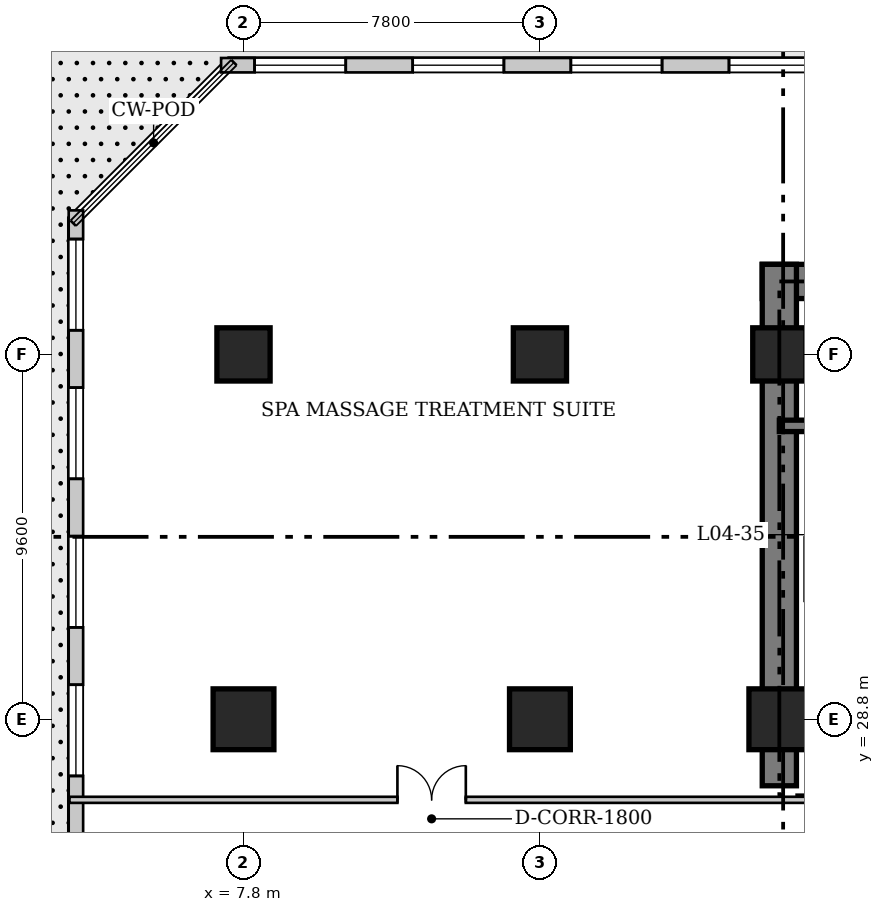
"""IFC4 building model, lengths in metres.
Left out: names, types, materials, properties, quantities, classifications, styles, units other than length and angle.
Written with IfcOpenShell. Run it as: python <this file> out.ifc"""

import sys

from ifc_helpers import new_model, si_unit, direction, frame, frame_2d, origin, origin_2d, place, context, subcontext, project, spatial, rectangle, extrude, element, fill, save


model = new_model("IFC4")
c1 = context("Model", 3, precision=1e-05, world=origin(), true_north=direction((0.0, 1.0)))
c2 = subcontext(c1, "Body", "Model", "MODEL_VIEW")
j1 = project(units=[si_unit("LENGTHUNIT", "METRE"), si_unit("PLANEANGLEUNIT", "RADIAN")], contexts=[c1])
p1 = place(None, origin())
s1 = spatial("IfcSite", under=j1, at=p1, CompositionType="ELEMENT")
p2 = place(p1, origin())
s2 = spatial("IfcBuilding", under=s1, at=p2, CompositionType="ELEMENT")
p3 = place(p2, frame((0.0, 0.0, 20.8)))
s3 = spatial("IfcBuildingStorey", under=s2, at=p3, CompositionType="ELEMENT", Elevation=20.8)
p4 = place(p3, frame((21.45, 40.32, 0.0), z_axis=(0.0, 0.0, 1.0), x_axis=(1.0, 0.0, 0.0)))
e1 = element("IfcWall", 1, at=p4, inside=s3, PredefinedType="SHEAR", context=c2, shape_type="SweptSolid", body=[
    extrude(rectangle(XDim=14.4, YDim=0.9, at=frame_2d((7.2, 0.0))), origin(), (0.0, 0.0, 1.0), 5.2),
])
p5 = place(p3, frame((21.9, 27.05, 0.0), z_axis=(0.0, 0.0, 1.0), x_axis=(0.0, 1.0, 0.0)))
e2 = element("IfcWall", 2, at=p5, inside=s3, PredefinedType="SHEAR", context=c2, shape_type="SweptSolid", body=[
    extrude(rectangle(XDim=13.72, YDim=0.9, at=frame_2d((6.86, 0.0))), origin(), (0.0, 0.0, 1.0), 5.2),
])
p6 = place(p3, frame((21.9, 36.52, 0.0), z_axis=(0.0, 0.0, 1.0), x_axis=(1.0, 0.0, 0.0)))
e3 = element("IfcWall", 3, at=p6, inside=s3, PredefinedType="SHEAR", context=c2, shape_type="SweptSolid", body=[
    extrude(rectangle(XDim=8.32, YDim=0.3, at=frame_2d((4.16, 0.0))), origin(), (0.0, 0.0, 1.0), 5.2),
])
p7 = place(p6, frame((0.9, 0.0, 0.0)))
e4 = element("IfcOpeningElement", 4, at=p7, cuts=e3, PredefinedType="OPENING", context=c2, shape_type="SweptSolid", body=[
    extrude(rectangle(XDim=1.1, YDim=2.15, at=frame_2d((0.55, 1.075))), frame((0.0, 0.16, 0.0), z_axis=(0.0, -1.0, 0.0), x_axis=(1.0, 0.0, 0.0)), (0.0, 0.0, 1.0), 0.32),
])
p8 = place(p3, frame((7.8, 28.8, 0.0), z_axis=(0.0, 0.0, 1.0), x_axis=(1.0, 0.0, 0.0)))
e5 = element("IfcColumn", 5, at=p8, inside=s3, PredefinedType="COLUMN", context=c2, shape_type="SweptSolid", body=[
    extrude(rectangle(XDim=1.6, YDim=1.6, at=origin_2d()), origin(), (0.0, 0.0, 1.0), 5.2),
])
p9 = place(p3, frame((7.8, 38.4, 0.0), z_axis=(0.0, 0.0, 1.0), x_axis=(1.0, 0.0, 0.0)))
e6 = element("IfcColumn", 6, at=p9, inside=s3, PredefinedType="COLUMN", context=c2, shape_type="SweptSolid", body=[
    extrude(rectangle(XDim=1.4, YDim=1.4, at=origin_2d()), origin(), (0.0, 0.0, 1.0), 5.2),
])
p10 = place(p3, frame((15.6, 28.8, 0.0), z_axis=(0.0, 0.0, 1.0), x_axis=(1.0, 0.0, 0.0)))
e7 = element("IfcColumn", 7, at=p10, inside=s3, PredefinedType="COLUMN", context=c2, shape_type="SweptSolid", body=[
    extrude(rectangle(XDim=1.6, YDim=1.6, at=origin_2d()), origin(), (0.0, 0.0, 1.0), 5.2),
])
p11 = place(p3, frame((15.6, 38.4, 0.0), z_axis=(0.0, 0.0, 1.0), x_axis=(1.0, 0.0, 0.0)))
e8 = element("IfcColumn", 8, at=p11, inside=s3, PredefinedType="COLUMN", context=c2, shape_type="SweptSolid", body=[
    extrude(rectangle(XDim=1.4, YDim=1.4, at=origin_2d()), origin(), (0.0, 0.0, 1.0), 5.2),
])
p12 = place(p3, frame((21.9, 28.8, 0.0), z_axis=(0.0, 0.0, 1.0), x_axis=(1.0, 0.0, 0.0)))
e9 = element("IfcColumn", 9, at=p12, inside=s3, PredefinedType="COLUMN", context=c2, shape_type="SweptSolid", body=[
    extrude(rectangle(XDim=1.6, YDim=1.6, at=origin_2d()), origin(), (0.0, 0.0, 1.0), 5.2),
])
p13 = place(p3, frame((21.9, 38.4, 0.0), z_axis=(0.0, 0.0, 1.0), x_axis=(1.0, 0.0, 0.0)))
e10 = element("IfcColumn", 10, at=p13, inside=s3, PredefinedType="COLUMN", context=c2, shape_type="SweptSolid", body=[
    extrude(rectangle(XDim=1.4, YDim=1.4, at=origin_2d()), origin(), (0.0, 0.0, 1.0), 5.2),
])
p14 = place(p3, frame((36.34, 46.01, 0.0), z_axis=(0.0, 0.0, 1.0), x_axis=(-1.0, 0.0, 0.0)))
e11 = element("IfcWall", 11, at=p14, inside=s3, PredefinedType="SOLIDWALL", context=c2, shape_type="SweptSolid", body=[
    extrude(rectangle(XDim=29.13, YDim=0.38, at=frame_2d((14.565, 0.0))), origin(), (0.0, 0.0, 1.0), 4.94),
])
p15 = place(p14, frame((0.881, 0.0, 0.75)))
e12 = element("IfcOpeningElement", 12, at=p15, cuts=e11, PredefinedType="OPENING", context=c2, shape_type="SweptSolid", body=[
    extrude(rectangle(XDim=2.4, YDim=2.2, at=frame_2d((1.2, 1.1))), frame((0.0, 0.2, 0.0), z_axis=(0.0, -1.0, 0.0), x_axis=(1.0, 0.0, 0.0)), (0.0, 0.0, 1.0), 0.4),
])
p16 = place(p14, frame((5.042, 0.0, 0.75)))
e13 = element("IfcOpeningElement", 13, at=p16, cuts=e11, PredefinedType="OPENING", context=c2, shape_type="SweptSolid", body=[
    extrude(rectangle(XDim=2.4, YDim=2.2, at=frame_2d((1.2, 1.1))), frame((0.0, 0.2, 0.0), z_axis=(0.0, -1.0, 0.0), x_axis=(1.0, 0.0, 0.0)), (0.0, 0.0, 1.0), 0.4),
])
p17 = place(p14, frame((9.204, 0.0, 0.75)))
e14 = element("IfcOpeningElement", 14, at=p17, cuts=e11, PredefinedType="OPENING", context=c2, shape_type="SweptSolid", body=[
    extrude(rectangle(XDim=2.4, YDim=2.2, at=frame_2d((1.2, 1.1))), frame((0.0, 0.2, 0.0), z_axis=(0.0, -1.0, 0.0), x_axis=(1.0, 0.0, 0.0)), (0.0, 0.0, 1.0), 0.4),
])
p18 = place(p14, frame((13.365, 0.0, 0.75)))
e15 = element("IfcOpeningElement", 15, at=p18, cuts=e11, PredefinedType="OPENING", context=c2, shape_type="SweptSolid", body=[
    extrude(rectangle(XDim=2.4, YDim=2.2, at=frame_2d((1.2, 1.1))), frame((0.0, 0.2, 0.0), z_axis=(0.0, -1.0, 0.0), x_axis=(1.0, 0.0, 0.0)), (0.0, 0.0, 1.0), 0.4),
])
p19 = place(p14, frame((17.526, 0.0, 0.75)))
e16 = element("IfcOpeningElement", 16, at=p19, cuts=e11, PredefinedType="OPENING", context=c2, shape_type="SweptSolid", body=[
    extrude(rectangle(XDim=2.4, YDim=2.2, at=frame_2d((1.2, 1.1))), frame((0.0, 0.2, 0.0), z_axis=(0.0, -1.0, 0.0), x_axis=(1.0, 0.0, 0.0)), (0.0, 0.0, 1.0), 0.4),
])
p20 = place(p14, frame((21.688, 0.0, 0.75)))
e17 = element("IfcOpeningElement", 17, at=p20, cuts=e11, PredefinedType="OPENING", context=c2, shape_type="SweptSolid", body=[
    extrude(rectangle(XDim=2.4, YDim=2.2, at=frame_2d((1.2, 1.1))), frame((0.0, 0.2, 0.0), z_axis=(0.0, -1.0, 0.0), x_axis=(1.0, 0.0, 0.0)), (0.0, 0.0, 1.0), 0.4),
])
p21 = place(p14, frame((25.849, 0.0, 0.75)))
e18 = element("IfcOpeningElement", 18, at=p21, cuts=e11, PredefinedType="OPENING", context=c2, shape_type="SweptSolid", body=[
    extrude(rectangle(XDim=2.4, YDim=2.2, at=frame_2d((1.2, 1.1))), frame((0.0, 0.2, 0.0), z_axis=(0.0, -1.0, 0.0), x_axis=(1.0, 0.0, 0.0)), (0.0, 0.0, 1.0), 0.4),
])
p22 = place(p3, frame((3.39, 42.19, 0.0), z_axis=(0.0, 0.0, 1.0), x_axis=(0.0, -1.0, 0.0)))
e19 = element("IfcWall", 19, at=p22, inside=s3, PredefinedType="SOLIDWALL", context=c2, shape_type="SweptSolid", body=[
    extrude(rectangle(XDim=35.18, YDim=0.38, at=frame_2d((17.59, 0.0))), origin(), (0.0, 0.0, 1.0), 4.94),
])
p23 = place(p22, frame((0.754, 0.0, 0.75)))
e20 = element("IfcOpeningElement", 20, at=p23, cuts=e19, PredefinedType="OPENING", context=c2, shape_type="SweptSolid", body=[
    extrude(rectangle(XDim=2.4, YDim=2.2, at=frame_2d((1.2, 1.1))), frame((0.0, 0.2, 0.0), z_axis=(0.0, -1.0, 0.0), x_axis=(1.0, 0.0, 0.0)), (0.0, 0.0, 1.0), 0.4),
])
p24 = place(p22, frame((4.663, 0.0, 0.75)))
e21 = element("IfcOpeningElement", 21, at=p24, cuts=e19, PredefinedType="OPENING", context=c2, shape_type="SweptSolid", body=[
    extrude(rectangle(XDim=2.4, YDim=2.2, at=frame_2d((1.2, 1.1))), frame((0.0, 0.2, 0.0), z_axis=(0.0, -1.0, 0.0), x_axis=(1.0, 0.0, 0.0)), (0.0, 0.0, 1.0), 0.4),
])
p25 = place(p22, frame((8.572, 0.0, 0.75)))
e22 = element("IfcOpeningElement", 22, at=p25, cuts=e19, PredefinedType="OPENING", context=c2, shape_type="SweptSolid", body=[
    extrude(rectangle(XDim=2.4, YDim=2.2, at=frame_2d((1.2, 1.1))), frame((0.0, 0.2, 0.0), z_axis=(0.0, -1.0, 0.0), x_axis=(1.0, 0.0, 0.0)), (0.0, 0.0, 1.0), 0.4),
])
p26 = place(p22, frame((12.481, 0.0, 0.75)))
e23 = element("IfcOpeningElement", 23, at=p26, cuts=e19, PredefinedType="OPENING", context=c2, shape_type="SweptSolid", body=[
    extrude(rectangle(XDim=2.4, YDim=2.2, at=frame_2d((1.2, 1.1))), frame((0.0, 0.2, 0.0), z_axis=(0.0, -1.0, 0.0), x_axis=(1.0, 0.0, 0.0)), (0.0, 0.0, 1.0), 0.4),
])
p27 = place(p22, frame((20.299, 0.0, 0.75)))
e24 = element("IfcOpeningElement", 24, at=p27, cuts=e19, PredefinedType="OPENING", context=c2, shape_type="SweptSolid", body=[
    extrude(rectangle(XDim=2.4, YDim=2.2, at=frame_2d((1.2, 1.1))), frame((0.0, 0.2, 0.0), z_axis=(0.0, -1.0, 0.0), x_axis=(1.0, 0.0, 0.0)), (0.0, 0.0, 1.0), 0.4),
])
p28 = place(p22, frame((24.208, 0.0, 0.75)))
e25 = element("IfcOpeningElement", 25, at=p28, cuts=e19, PredefinedType="OPENING", context=c2, shape_type="SweptSolid", body=[
    extrude(rectangle(XDim=2.4, YDim=2.2, at=frame_2d((1.2, 1.1))), frame((0.0, 0.2, 0.0), z_axis=(0.0, -1.0, 0.0), x_axis=(1.0, 0.0, 0.0)), (0.0, 0.0, 1.0), 0.4),
])
p29 = place(p22, frame((28.117, 0.0, 0.75)))
e26 = element("IfcOpeningElement", 26, at=p29, cuts=e19, PredefinedType="OPENING", context=c2, shape_type="SweptSolid", body=[
    extrude(rectangle(XDim=2.4, YDim=2.2, at=frame_2d((1.2, 1.1))), frame((0.0, 0.2, 0.0), z_axis=(0.0, -1.0, 0.0), x_axis=(1.0, 0.0, 0.0)), (0.0, 0.0, 1.0), 0.4),
])
p30 = place(p22, frame((32.026, 0.0, 0.75)))
e27 = element("IfcOpeningElement", 27, at=p30, cuts=e19, PredefinedType="OPENING", context=c2, shape_type="SweptSolid", body=[
    extrude(rectangle(XDim=2.4, YDim=2.2, at=frame_2d((1.2, 1.1))), frame((0.0, 0.2, 0.0), z_axis=(0.0, -1.0, 0.0), x_axis=(1.0, 0.0, 0.0)), (0.0, 0.0, 1.0), 0.4),
])
p31 = place(p3, frame((3.22, 26.68, 0.0), z_axis=(0.0, 0.0, 1.0), x_axis=(1.0, 0.0, 0.0)))
e28 = element("IfcWall", 28, at=p31, inside=s3, PredefinedType="PARTITIONING", context=c2, shape_type="SweptSolid", body=[
    extrude(rectangle(XDim=71.56, YDim=0.16, at=frame_2d((35.78, 0.0))), origin(), (0.0, 0.0, 1.0), 4.94),
])
p32 = place(p31, frame((34.88, 0.0, 0.0)))
e29 = element("IfcOpeningElement", 29, at=p32, cuts=e28, PredefinedType="OPENING", context=c2, shape_type="SweptSolid", body=[
    extrude(rectangle(XDim=1.8, YDim=2.2, at=frame_2d((0.9, 1.1))), frame((0.0, 0.09, 0.0), z_axis=(0.0, -1.0, 0.0), x_axis=(1.0, 0.0, 0.0)), (0.0, 0.0, 1.0), 0.18),
])
p33 = place(p31, frame((8.63, 0.0, 0.0)))
e30 = element("IfcOpeningElement", 30, at=p33, cuts=e28, PredefinedType="OPENING", context=c2, shape_type="SweptSolid", body=[
    extrude(rectangle(XDim=1.8, YDim=2.2, at=frame_2d((0.9, 1.1))), frame((0.0, 0.09, 0.0), z_axis=(0.0, -1.0, 0.0), x_axis=(1.0, 0.0, 0.0)), (0.0, 0.0, 1.0), 0.18),
])
p34 = place(p31, frame((61.53, 0.0, 0.0)))
e31 = element("IfcOpeningElement", 31, at=p34, cuts=e28, PredefinedType="OPENING", context=c2, shape_type="SweptSolid", body=[
    extrude(rectangle(XDim=1.8, YDim=2.2, at=frame_2d((0.9, 1.1))), frame((0.0, 0.09, 0.0), z_axis=(0.0, -1.0, 0.0), x_axis=(1.0, 0.0, 0.0)), (0.0, 0.0, 1.0), 0.18),
])
p35 = place(p18, origin())
e32 = element("IfcWindow", 32, at=p35, inside=s3, PartitioningType="SINGLE_PANEL", PredefinedType="WINDOW", context=c2, shape_type="SweptSolid", body=[
    extrude(rectangle(XDim=2.4, YDim=2.2, at=frame_2d((1.2, 1.1))), frame((0.0, 0.03, 0.0), z_axis=(0.0, -1.0, 0.0), x_axis=(1.0, 0.0, 0.0)), (0.0, 0.0, 1.0), 0.06),
])
fill(e15, e32)
p36 = place(p19, origin())
e33 = element("IfcWindow", 33, at=p36, inside=s3, PartitioningType="SINGLE_PANEL", PredefinedType="WINDOW", context=c2, shape_type="SweptSolid", body=[
    extrude(rectangle(XDim=2.4, YDim=2.2, at=frame_2d((1.2, 1.1))), frame((0.0, 0.03, 0.0), z_axis=(0.0, -1.0, 0.0), x_axis=(1.0, 0.0, 0.0)), (0.0, 0.0, 1.0), 0.06),
])
fill(e16, e33)
p37 = place(p20, origin())
e34 = element("IfcWindow", 34, at=p37, inside=s3, PartitioningType="SINGLE_PANEL", PredefinedType="WINDOW", context=c2, shape_type="SweptSolid", body=[
    extrude(rectangle(XDim=2.4, YDim=2.2, at=frame_2d((1.2, 1.1))), frame((0.0, 0.03, 0.0), z_axis=(0.0, -1.0, 0.0), x_axis=(1.0, 0.0, 0.0)), (0.0, 0.0, 1.0), 0.06),
])
fill(e17, e34)
p38 = place(p21, origin())
e35 = element("IfcWindow", 35, at=p38, inside=s3, PartitioningType="SINGLE_PANEL", PredefinedType="WINDOW", context=c2, shape_type="SweptSolid", body=[
    extrude(rectangle(XDim=2.4, YDim=2.2, at=frame_2d((1.2, 1.1))), frame((0.0, 0.03, 0.0), z_axis=(0.0, -1.0, 0.0), x_axis=(1.0, 0.0, 0.0)), (0.0, 0.0, 1.0), 0.06),
])
fill(e18, e35)
p39 = place(p23, origin())
e36 = element("IfcWindow", 36, at=p39, inside=s3, PartitioningType="SINGLE_PANEL", PredefinedType="WINDOW", context=c2, shape_type="SweptSolid", body=[
    extrude(rectangle(XDim=2.4, YDim=2.2, at=frame_2d((1.2, 1.1))), frame((0.0, 0.03, 0.0), z_axis=(0.0, -1.0, 0.0), x_axis=(1.0, 0.0, 0.0)), (0.0, 0.0, 1.0), 0.06),
])
fill(e20, e36)
p40 = place(p24, origin())
e37 = element("IfcWindow", 37, at=p40, inside=s3, PartitioningType="SINGLE_PANEL", PredefinedType="WINDOW", context=c2, shape_type="SweptSolid", body=[
    extrude(rectangle(XDim=2.4, YDim=2.2, at=frame_2d((1.2, 1.1))), frame((0.0, 0.03, 0.0), z_axis=(0.0, -1.0, 0.0), x_axis=(1.0, 0.0, 0.0)), (0.0, 0.0, 1.0), 0.06),
])
fill(e21, e37)
p41 = place(p25, origin())
e38 = element("IfcWindow", 38, at=p41, inside=s3, PartitioningType="SINGLE_PANEL", PredefinedType="WINDOW", context=c2, shape_type="SweptSolid", body=[
    extrude(rectangle(XDim=2.4, YDim=2.2, at=frame_2d((1.2, 1.1))), frame((0.0, 0.03, 0.0), z_axis=(0.0, -1.0, 0.0), x_axis=(1.0, 0.0, 0.0)), (0.0, 0.0, 1.0), 0.06),
])
fill(e22, e38)
p42 = place(p26, origin())
e39 = element("IfcWindow", 39, at=p42, inside=s3, PartitioningType="SINGLE_PANEL", PredefinedType="WINDOW", context=c2, shape_type="SweptSolid", body=[
    extrude(rectangle(XDim=2.4, YDim=2.2, at=frame_2d((1.2, 1.1))), frame((0.0, 0.03, 0.0), z_axis=(0.0, -1.0, 0.0), x_axis=(1.0, 0.0, 0.0)), (0.0, 0.0, 1.0), 0.06),
])
fill(e23, e39)
p43 = place(p33, origin())
e40 = element("IfcDoor", 40, at=p43, inside=s3, OperationType="DOUBLE_DOOR_SINGLE_SWING", PredefinedType="DOOR", context=c2, shape_type="SweptSolid", body=[
    extrude(rectangle(XDim=1.8, YDim=2.2, at=frame_2d((0.9, 1.1))), frame((0.0, 0.025, 0.0), z_axis=(0.0, -1.0, 0.0), x_axis=(1.0, 0.0, 0.0)), (0.0, 0.0, 1.0), 0.05),
])
fill(e30, e40)
save(model, sys.argv[1])
